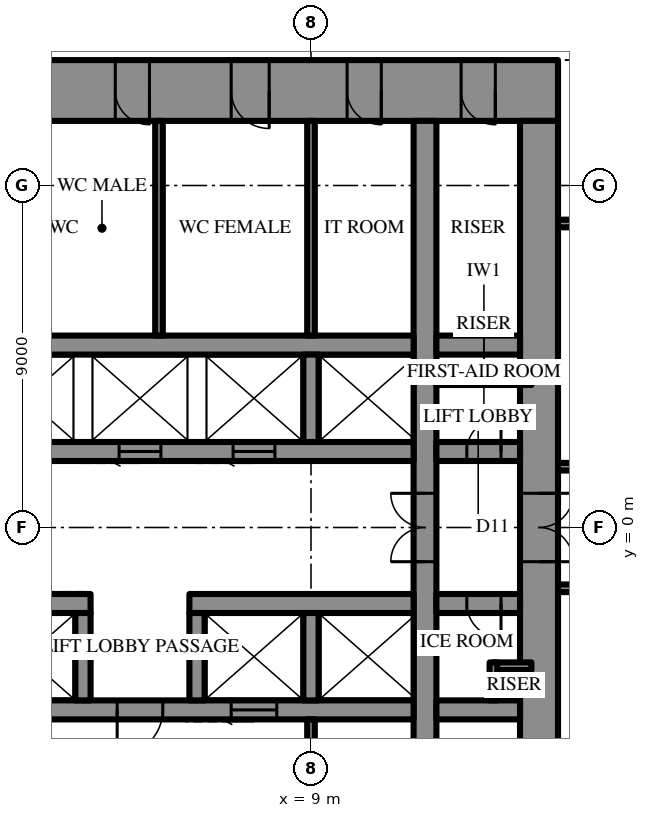
"""IFC4 building model, lengths in metres.
Left out: names, types, materials, properties, quantities, classifications, styles, units other than length and angle.
Written with IfcOpenShell. Run it as: python <this file> out.ifc"""

import sys

from ifc_helpers import new_model, si_unit, direction, frame, frame_2d, origin, place, context, subcontext, project, spatial, rectangle, extrude, element, fill, save


model = new_model("IFC4")
c1 = context("Model", 3, precision=1e-05, world=origin(), true_north=direction((0.0, 1.0)))
c2 = subcontext(c1, "Body", "Model", "MODEL_VIEW")
j1 = project(units=[si_unit("LENGTHUNIT", "METRE"), si_unit("PLANEANGLEUNIT", "RADIAN")], contexts=[c1])
p1 = place(None, origin())
s1 = spatial("IfcSite", under=j1, at=p1, CompositionType="ELEMENT")
p2 = place(p1, origin())
s2 = spatial("IfcBuilding", under=s1, at=p2, CompositionType="ELEMENT")
p3 = place(p2, frame((0.0, 0.0, 215.5)))
s3 = spatial("IfcBuildingStorey", under=s2, at=p3, CompositionType="ELEMENT", Elevation=215.5)
p4 = place(p3, frame((-15.5, 11.5, 0.0), z_axis=(0.0, 0.0, 1.0), x_axis=(1.0, 0.0, 0.0)))
e1 = element("IfcWall", 1, at=p4, inside=s3, PredefinedType="SHEAR", context=c2, shape_type="SweptSolid", body=[
    extrude(rectangle(XDim=31.0, YDim=1.6, at=frame_2d((15.5, 0.0))), origin(), (0.0, 0.0, 1.0), 4.2),
])
p5 = place(p4, frame((16.35, 0.0, 0.0)))
e2 = element("IfcOpeningElement", 2, at=p5, cuts=e1, PredefinedType="OPENING", context=c2, shape_type="SweptSolid", body=[
    extrude(rectangle(XDim=0.9, YDim=2.2, at=frame_2d((0.45, 1.1))), frame((0.0, 0.81, 0.0), z_axis=(0.0, -1.0, 0.0), x_axis=(1.0, 0.0, 0.0)), (0.0, 0.0, 1.0), 1.62),
])
p6 = place(p4, frame((19.35, 0.0, 0.0)))
e3 = element("IfcOpeningElement", 3, at=p6, cuts=e1, PredefinedType="OPENING", context=c2, shape_type="SweptSolid", body=[
    extrude(rectangle(XDim=0.9, YDim=2.2, at=frame_2d((0.45, 1.1))), frame((0.0, 0.81, 0.0), z_axis=(0.0, -1.0, 0.0), x_axis=(1.0, 0.0, 0.0)), (0.0, 0.0, 1.0), 1.62),
])
p7 = place(p4, frame((22.4, 0.0, 0.0)))
e4 = element("IfcOpeningElement", 4, at=p7, cuts=e1, PredefinedType="OPENING", context=c2, shape_type="SweptSolid", body=[
    extrude(rectangle(XDim=1.0, YDim=2.2, at=frame_2d((0.5, 1.1))), frame((0.0, 0.81, 0.0), z_axis=(0.0, -1.0, 0.0), x_axis=(1.0, 0.0, 0.0)), (0.0, 0.0, 1.0), 1.62),
])
p8 = place(p4, frame((1.65, 0.0, 0.0)))
e5 = element("IfcOpeningElement", 5, at=p8, cuts=e1, PredefinedType="OPENING", context=c2, shape_type="SweptSolid", body=[
    extrude(rectangle(XDim=0.9, YDim=2.2, at=frame_2d((0.45, 1.1))), frame((0.0, 0.81, 0.0), z_axis=(0.0, -1.0, 0.0), x_axis=(1.0, 0.0, 0.0)), (0.0, 0.0, 1.0), 1.62),
])
p9 = place(p4, frame((4.65, 0.0, 0.0)))
e6 = element("IfcOpeningElement", 6, at=p9, cuts=e1, PredefinedType="OPENING", context=c2, shape_type="SweptSolid", body=[
    extrude(rectangle(XDim=0.9, YDim=2.2, at=frame_2d((0.45, 1.1))), frame((0.0, 0.81, 0.0), z_axis=(0.0, -1.0, 0.0), x_axis=(1.0, 0.0, 0.0)), (0.0, 0.0, 1.0), 1.62),
])
p10 = place(p4, frame((25.45, 0.0, 0.0)))
e7 = element("IfcOpeningElement", 7, at=p10, cuts=e1, PredefinedType="OPENING", context=c2, shape_type="SweptSolid", body=[
    extrude(rectangle(XDim=0.9, YDim=2.2, at=frame_2d((0.45, 1.1))), frame((0.0, 0.81, 0.0), z_axis=(0.0, -1.0, 0.0), x_axis=(1.0, 0.0, 0.0)), (0.0, 0.0, 1.0), 1.62),
])
p11 = place(p4, frame((28.45, 0.0, 0.0)))
e8 = element("IfcOpeningElement", 8, at=p11, cuts=e1, PredefinedType="OPENING", context=c2, shape_type="SweptSolid", body=[
    extrude(rectangle(XDim=0.9, YDim=2.2, at=frame_2d((0.45, 1.1))), frame((0.0, 0.81, 0.0), z_axis=(0.0, -1.0, 0.0), x_axis=(1.0, 0.0, 0.0)), (0.0, 0.0, 1.0), 1.62),
])
p12 = place(p3, frame((15.0, -10.7, 0.0), z_axis=(0.0, 0.0, 1.0), x_axis=(0.0, 1.0, 0.0)))
e9 = element("IfcWall", 9, at=p12, inside=s3, PredefinedType="SHEAR", context=c2, shape_type="SweptSolid", body=[
    extrude(rectangle(XDim=21.4, YDim=1.0, at=frame_2d((10.7, 0.0))), origin(), (0.0, 0.0, 1.0), 4.2),
])
p13 = place(p12, frame((9.8, 0.0, 0.0)))
e10 = element("IfcOpeningElement", 10, at=p13, cuts=e9, PredefinedType="OPENING", context=c2, shape_type="SweptSolid", body=[
    extrude(rectangle(XDim=1.8, YDim=2.4, at=frame_2d((0.9, 1.2))), frame((0.0, 0.51, 0.0), z_axis=(0.0, -1.0, 0.0), x_axis=(1.0, 0.0, 0.0)), (0.0, 0.0, 1.0), 1.02),
])
p14 = place(p3, frame((12.0, -10.7, 0.0), z_axis=(0.0, 0.0, 1.0), x_axis=(0.0, 1.0, 0.0)))
e11 = element("IfcWall", 11, at=p14, inside=s3, PredefinedType="SHEAR", context=c2, shape_type="SweptSolid", body=[
    extrude(rectangle(XDim=21.4, YDim=0.6, at=frame_2d((10.7, 0.0))), origin(), (0.0, 0.0, 1.0), 4.2),
])
p15 = place(p14, frame((9.8, 0.0, 0.0)))
e12 = element("IfcOpeningElement", 12, at=p15, cuts=e11, PredefinedType="OPENING", context=c2, shape_type="SweptSolid", body=[
    extrude(rectangle(XDim=1.8, YDim=2.4, at=frame_2d((0.9, 1.2))), frame((0.0, 0.31, 0.0), z_axis=(0.0, -1.0, 0.0), x_axis=(1.0, 0.0, 0.0)), (0.0, 0.0, 1.0), 0.62),
])
p16 = place(p3, frame((-3.2, 2.0, 0.0), z_axis=(0.0, 0.0, 1.0), x_axis=(1.0, 0.0, 0.0)))
e13 = element("IfcWall", 13, at=p16, inside=s3, PredefinedType="SHEAR", context=c2, shape_type="SweptSolid", body=[
    extrude(rectangle(XDim=14.9, YDim=0.5, at=frame_2d((7.45, 0.0))), origin(), (0.0, 0.0, 1.0), 4.2),
])
p17 = place(p16, frame((1.15, 0.0, 0.0)))
e14 = element("IfcOpeningElement", 14, at=p17, cuts=e13, PredefinedType="OPENING", context=c2, shape_type="SweptSolid", body=[
    extrude(rectangle(XDim=1.1, YDim=2.2, at=frame_2d((0.55, 1.1))), frame((0.0, 0.26, 0.0), z_axis=(0.0, -1.0, 0.0), x_axis=(1.0, 0.0, 0.0)), (0.0, 0.0, 1.0), 0.52),
])
p18 = place(p16, frame((4.15, 0.0, 0.0)))
e15 = element("IfcOpeningElement", 15, at=p18, cuts=e13, PredefinedType="OPENING", context=c2, shape_type="SweptSolid", body=[
    extrude(rectangle(XDim=1.1, YDim=2.2, at=frame_2d((0.55, 1.1))), frame((0.0, 0.26, 0.0), z_axis=(0.0, -1.0, 0.0), x_axis=(1.0, 0.0, 0.0)), (0.0, 0.0, 1.0), 0.52),
])
p19 = place(p16, frame((7.15, 0.0, 0.0)))
e16 = element("IfcOpeningElement", 16, at=p19, cuts=e13, PredefinedType="OPENING", context=c2, shape_type="SweptSolid", body=[
    extrude(rectangle(XDim=1.1, YDim=2.2, at=frame_2d((0.55, 1.1))), frame((0.0, 0.26, 0.0), z_axis=(0.0, -1.0, 0.0), x_axis=(1.0, 0.0, 0.0)), (0.0, 0.0, 1.0), 0.52),
])
p20 = place(p16, frame((10.15, 0.0, 0.0)))
e17 = element("IfcOpeningElement", 17, at=p20, cuts=e13, PredefinedType="OPENING", context=c2, shape_type="SweptSolid", body=[
    extrude(rectangle(XDim=1.1, YDim=2.2, at=frame_2d((0.55, 1.1))), frame((0.0, 0.26, 0.0), z_axis=(0.0, -1.0, 0.0), x_axis=(1.0, 0.0, 0.0)), (0.0, 0.0, 1.0), 0.52),
])
p21 = place(p3, frame((12.3, 2.0, 0.0), z_axis=(0.0, 0.0, 1.0), x_axis=(1.0, 0.0, 0.0)))
e18 = element("IfcWall", 18, at=p21, inside=s3, PredefinedType="SHEAR", context=c2, shape_type="SweptSolid", body=[
    extrude(rectangle(XDim=2.2, YDim=0.5, at=frame_2d((1.1, 0.0))), origin(), (0.0, 0.0, 1.0), 4.2),
])
p22 = place(p21, frame((0.8, 0.0, 0.0)))
e19 = element("IfcOpeningElement", 19, at=p22, cuts=e18, PredefinedType="OPENING", context=c2, shape_type="SweptSolid", body=[
    extrude(rectangle(XDim=0.9, YDim=2.2, at=frame_2d((0.45, 1.1))), frame((0.0, 0.26, 0.0), z_axis=(0.0, -1.0, 0.0), x_axis=(1.0, 0.0, 0.0)), (0.0, 0.0, 1.0), 0.52),
])
p23 = place(p3, frame((-11.7, 4.8, 0.0), z_axis=(0.0, 0.0, 1.0), x_axis=(1.0, 0.0, 0.0)))
e20 = element("IfcWall", 20, at=p23, inside=s3, PredefinedType="SHEAR", context=c2, shape_type="SweptSolid", body=[
    extrude(rectangle(XDim=23.4, YDim=0.5, at=frame_2d((11.7, 0.0))), origin(), (0.0, 0.0, 1.0), 4.2),
])
p24 = place(p23, frame((6.6, 0.0, 0.0)))
e21 = element("IfcOpeningElement", 21, at=p24, cuts=e20, PredefinedType="OPENING", context=c2, shape_type="SweptSolid", body=[
    extrude(rectangle(XDim=1.2, YDim=2.2, at=frame_2d((0.6, 1.1))), frame((0.0, 0.26, 0.0), z_axis=(0.0, -1.0, 0.0), x_axis=(1.0, 0.0, 0.0)), (0.0, 0.0, 1.0), 0.52),
])
p25 = place(p23, frame((3.6, 0.0, 0.0)))
e22 = element("IfcOpeningElement", 22, at=p25, cuts=e20, PredefinedType="OPENING", context=c2, shape_type="SweptSolid", body=[
    extrude(rectangle(XDim=1.2, YDim=2.2, at=frame_2d((0.6, 1.1))), frame((0.0, 0.26, 0.0), z_axis=(0.0, -1.0, 0.0), x_axis=(1.0, 0.0, 0.0)), (0.0, 0.0, 1.0), 0.52),
])
p26 = place(p3, frame((12.3, 4.8, 0.0), z_axis=(0.0, 0.0, 1.0), x_axis=(1.0, 0.0, 0.0)))
e23 = element("IfcWall", 23, at=p26, inside=s3, PredefinedType="SHEAR", context=c2, shape_type="SweptSolid", body=[
    extrude(rectangle(XDim=2.2, YDim=0.5, at=frame_2d((1.1, 0.0))), origin(), (0.0, 0.0, 1.0), 4.2),
])
p27 = place(p3, frame((9.0, 2.25, 0.0), z_axis=(0.0, 0.0, 1.0), x_axis=(0.0, 1.0, 0.0)))
e24 = element("IfcWall", 24, at=p27, inside=s3, PredefinedType="SHEAR", context=c2, shape_type="SweptSolid", body=[
    extrude(rectangle(XDim=2.3, YDim=0.4, at=frame_2d((1.15, 0.0))), origin(), (0.0, 0.0, 1.0), 4.2),
])
p28 = place(p3, frame((14.5, -2.0, 0.0), z_axis=(0.0, 0.0, 1.0), x_axis=(-1.0, 0.0, 0.0)))
e25 = element("IfcWall", 25, at=p28, inside=s3, PredefinedType="SHEAR", context=c2, shape_type="SweptSolid", body=[
    extrude(rectangle(XDim=2.2, YDim=0.5, at=frame_2d((1.1, 0.0))), origin(), (0.0, 0.0, 1.0), 4.2),
])
p29 = place(p28, frame((0.5, 0.0, 0.0)))
e26 = element("IfcOpeningElement", 26, at=p29, cuts=e25, PredefinedType="OPENING", context=c2, shape_type="SweptSolid", body=[
    extrude(rectangle(XDim=0.9, YDim=2.2, at=frame_2d((0.45, 1.1))), frame((0.0, 0.26, 0.0), z_axis=(0.0, -1.0, 0.0), x_axis=(1.0, 0.0, 0.0)), (0.0, 0.0, 1.0), 0.52),
])
p30 = place(p3, frame((11.7, -2.0, 0.0), z_axis=(0.0, 0.0, 1.0), x_axis=(-1.0, 0.0, 0.0)))
e27 = element("IfcWall", 27, at=p30, inside=s3, PredefinedType="SHEAR", context=c2, shape_type="SweptSolid", body=[
    extrude(rectangle(XDim=5.9, YDim=0.5, at=frame_2d((2.95, 0.0))), origin(), (0.0, 0.0, 1.0), 4.2),
])
p31 = place(p3, frame((3.2, -2.0, 0.0), z_axis=(0.0, 0.0, 1.0), x_axis=(-1.0, 0.0, 0.0)))
e28 = element("IfcWall", 28, at=p31, inside=s3, PredefinedType="SHEAR", context=c2, shape_type="SweptSolid", body=[
    extrude(rectangle(XDim=14.9, YDim=0.5, at=frame_2d((7.45, 0.0))), origin(), (0.0, 0.0, 1.0), 4.2),
])
p32 = place(p31, frame((1.15, 0.0, 0.0)))
e29 = element("IfcOpeningElement", 29, at=p32, cuts=e28, PredefinedType="OPENING", context=c2, shape_type="SweptSolid", body=[
    extrude(rectangle(XDim=1.1, YDim=2.2, at=frame_2d((0.55, 1.1))), frame((0.0, 0.26, 0.0), z_axis=(0.0, -1.0, 0.0), x_axis=(1.0, 0.0, 0.0)), (0.0, 0.0, 1.0), 0.52),
])
p33 = place(p31, frame((4.15, 0.0, 0.0)))
e30 = element("IfcOpeningElement", 30, at=p33, cuts=e28, PredefinedType="OPENING", context=c2, shape_type="SweptSolid", body=[
    extrude(rectangle(XDim=1.1, YDim=2.2, at=frame_2d((0.55, 1.1))), frame((0.0, 0.26, 0.0), z_axis=(0.0, -1.0, 0.0), x_axis=(1.0, 0.0, 0.0)), (0.0, 0.0, 1.0), 0.52),
])
p34 = place(p31, frame((7.15, 0.0, 0.0)))
e31 = element("IfcOpeningElement", 31, at=p34, cuts=e28, PredefinedType="OPENING", context=c2, shape_type="SweptSolid", body=[
    extrude(rectangle(XDim=1.1, YDim=2.2, at=frame_2d((0.55, 1.1))), frame((0.0, 0.26, 0.0), z_axis=(0.0, -1.0, 0.0), x_axis=(1.0, 0.0, 0.0)), (0.0, 0.0, 1.0), 0.52),
])
p35 = place(p31, frame((10.15, 0.0, 0.0)))
e32 = element("IfcOpeningElement", 32, at=p35, cuts=e28, PredefinedType="OPENING", context=c2, shape_type="SweptSolid", body=[
    extrude(rectangle(XDim=1.1, YDim=2.2, at=frame_2d((0.55, 1.1))), frame((0.0, 0.26, 0.0), z_axis=(0.0, -1.0, 0.0), x_axis=(1.0, 0.0, 0.0)), (0.0, 0.0, 1.0), 0.52),
])
p36 = place(p3, frame((14.5, -4.8, 0.0), z_axis=(0.0, 0.0, 1.0), x_axis=(-1.0, 0.0, 0.0)))
e33 = element("IfcWall", 33, at=p36, inside=s3, PredefinedType="SHEAR", context=c2, shape_type="SweptSolid", body=[
    extrude(rectangle(XDim=2.2, YDim=0.5, at=frame_2d((1.1, 0.0))), origin(), (0.0, 0.0, 1.0), 4.2),
])
p37 = place(p3, frame((11.7, -4.8, 0.0), z_axis=(0.0, 0.0, 1.0), x_axis=(-1.0, 0.0, 0.0)))
e34 = element("IfcWall", 34, at=p37, inside=s3, PredefinedType="SHEAR", context=c2, shape_type="SweptSolid", body=[
    extrude(rectangle(XDim=23.4, YDim=0.5, at=frame_2d((11.7, 0.0))), origin(), (0.0, 0.0, 1.0), 4.2),
])
p38 = place(p37, frame((6.6, 0.0, 0.0)))
e35 = element("IfcOpeningElement", 35, at=p38, cuts=e34, PredefinedType="OPENING", context=c2, shape_type="SweptSolid", body=[
    extrude(rectangle(XDim=1.2, YDim=2.2, at=frame_2d((0.6, 1.1))), frame((0.0, 0.26, 0.0), z_axis=(0.0, -1.0, 0.0), x_axis=(1.0, 0.0, 0.0)), (0.0, 0.0, 1.0), 0.52),
])
p39 = place(p37, frame((3.6, 0.0, 0.0)))
e36 = element("IfcOpeningElement", 36, at=p39, cuts=e34, PredefinedType="OPENING", context=c2, shape_type="SweptSolid", body=[
    extrude(rectangle(XDim=1.2, YDim=2.2, at=frame_2d((0.6, 1.1))), frame((0.0, 0.26, 0.0), z_axis=(0.0, -1.0, 0.0), x_axis=(1.0, 0.0, 0.0)), (0.0, 0.0, 1.0), 0.52),
])
for number, where, z_axis, x_axis in (
    (37, (9.0, -2.25, 0.0), (0.0, 0.0, 1.0), (0.0, -1.0, 0.0)),
    (38, (6.0, -2.25, 0.0), (0.0, 0.0, 1.0), (0.0, -1.0, 0.0)),
    (39, (3.0, -2.25, 0.0), (0.0, 0.0, 1.0), (0.0, -1.0, 0.0)),
):
    element("IfcWall", number, at=place(p3, frame(where, z_axis=z_axis, x_axis=x_axis)), inside=s3, PredefinedType="SHEAR", context=c2, shape_type="SweptSolid", body=[
        extrude(rectangle(XDim=2.3, YDim=0.4, at=frame_2d((1.15, 0.0))), origin(), (0.0, 0.0, 1.0), 4.2),
    ])
for number, where, z_axis, x_axis in (
    (40, (9.0, 5.05, 0.0), (0.0, 0.0, 1.0), (0.0, 1.0, 0.0)),
    (41, (5.0, 5.05, 0.0), (0.0, 0.0, 1.0), (0.0, 1.0, 0.0)),
    (42, (9.0, -5.05, 0.0), (0.0, 0.0, 1.0), (0.0, -1.0, 0.0)),
):
    element("IfcWall", number, at=place(p3, frame(where, z_axis=z_axis, x_axis=x_axis)), inside=s3, PredefinedType="PARTITIONING", context=c2, shape_type="SweptSolid", body=[
        extrude(rectangle(XDim=5.65, YDim=0.2, at=frame_2d((2.825, 0.0))), origin(), (0.0, 0.0, 1.0), 4.0),
    ])
p40 = place(p3, frame((12.3, 3.85, 0.0), z_axis=(0.0, 0.0, 1.0), x_axis=(1.0, 0.0, 0.0)))
e43 = element("IfcWall", 43, at=p40, inside=s3, PredefinedType="PARTITIONING", context=c2, shape_type="SweptSolid", body=[
    extrude(rectangle(XDim=2.5, YDim=0.2, at=frame_2d((1.25, 0.0))), origin(), (0.0, 0.0, 1.0), 4.0),
])
for number, where, z_axis, x_axis in (
    (44, (14.8, -3.65, 0.0), (0.0, 0.0, 1.0), (-1.0, 0.0, 0.0)),
    (45, (13.8, -3.55, 0.0), (0.0, 0.0, 1.0), (0.0, -1.0, 0.0)),
):
    element("IfcWall", number, at=place(p3, frame(where, z_axis=z_axis, x_axis=x_axis)), inside=s3, PredefinedType="PARTITIONING", context=c2, shape_type="SweptSolid", body=[
        extrude(rectangle(XDim=1.0, YDim=0.2, at=frame_2d((0.5, 0.0))), origin(), (0.0, 0.0, 1.0), 4.0),
    ])
p41 = place(p3, frame((15.5, 1.6, 0.0), z_axis=(0.0, 0.0, 1.0), x_axis=(1.0, 0.0, 0.0)))
e46 = element("IfcWall", 46, at=p41, inside=s3, PredefinedType="PARTITIONING", context=c2, shape_type="SweptSolid", body=[
    extrude(rectangle(XDim=2.3, YDim=0.2, at=frame_2d((1.15, 0.0))), origin(), (0.0, 0.0, 1.0), 4.0),
])
p42 = place(p3, frame((15.5, -1.6, 0.0), z_axis=(0.0, 0.0, 1.0), x_axis=(1.0, 0.0, 0.0)))
e47 = element("IfcWall", 47, at=p42, inside=s3, PredefinedType="PARTITIONING", context=c2, shape_type="SweptSolid", body=[
    extrude(rectangle(XDim=9.7, YDim=0.2, at=frame_2d((4.85, 0.0))), origin(), (0.0, 0.0, 1.0), 4.0),
])
p43 = place(p42, frame((4.35, 0.0, 0.0)))
e48 = element("IfcOpeningElement", 48, at=p43, cuts=e47, PredefinedType="OPENING", context=c2, shape_type="SweptSolid", body=[
    extrude(rectangle(XDim=1.0, YDim=2.2, at=frame_2d((0.5, 1.1))), frame((0.0, 0.11, 0.0), z_axis=(0.0, -1.0, 0.0), x_axis=(1.0, 0.0, 0.0)), (0.0, 0.0, 1.0), 0.22),
])
p44 = place(p3, frame((15.5, 8.0, 0.0), z_axis=(0.0, 0.0, 1.0), x_axis=(1.0, 0.0, 0.0)))
e49 = element("IfcWall", 49, at=p44, inside=s3, PredefinedType="PARTITIONING", context=c2, shape_type="SweptSolid", body=[
    extrude(rectangle(XDim=13.113, YDim=0.2, at=frame_2d((6.557, 0.0))), origin(), (0.0, 0.0, 1.0), 4.0),
])
p45 = place(p44, frame((0.811, 0.0, 0.0)))
e50 = element("IfcOpeningElement", 50, at=p45, cuts=e49, PredefinedType="OPENING", context=c2, shape_type="SweptSolid", body=[
    extrude(rectangle(XDim=1.0, YDim=2.2, at=frame_2d((0.5, 1.1))), frame((0.0, 0.11, 0.0), z_axis=(0.0, -1.0, 0.0), x_axis=(1.0, 0.0, 0.0)), (0.0, 0.0, 1.0), 0.22),
])
p46 = place(p13, frame((1.8, 0.0, 0.0), z_axis=(0.0, 0.0, 1.0), x_axis=(-1.0, 0.0, 0.0)))
e51 = element("IfcDoor", 51, at=p46, inside=s3, OperationType="DOUBLE_DOOR_SINGLE_SWING", PredefinedType="DOOR", context=c2, shape_type="SweptSolid", body=[
    extrude(rectangle(XDim=1.8, YDim=2.4, at=frame_2d((0.9, 1.2))), frame((0.0, 0.025, 0.0), z_axis=(0.0, -1.0, 0.0), x_axis=(1.0, 0.0, 0.0)), (0.0, 0.0, 1.0), 0.05),
])
fill(e10, e51)
p47 = place(p6, frame((0.9, 0.0, 0.0), z_axis=(0.0, 0.0, 1.0), x_axis=(-1.0, 0.0, 0.0)))
e52 = element("IfcDoor", 52, at=p47, inside=s3, OperationType="SINGLE_SWING_RIGHT", PredefinedType="DOOR", context=c2, shape_type="SweptSolid", body=[
    extrude(rectangle(XDim=0.9, YDim=2.2, at=frame_2d((0.45, 1.1))), frame((0.0, 0.025, 0.0), z_axis=(0.0, -1.0, 0.0), x_axis=(1.0, 0.0, 0.0)), (0.0, 0.0, 1.0), 0.05),
])
fill(e3, e52)
p48 = place(p7, frame((1.0, 0.0, 0.0), z_axis=(0.0, 0.0, 1.0), x_axis=(-1.0, 0.0, 0.0)))
e53 = element("IfcDoor", 53, at=p48, inside=s3, OperationType="SINGLE_SWING_RIGHT", PredefinedType="DOOR", context=c2, shape_type="SweptSolid", body=[
    extrude(rectangle(XDim=1.0, YDim=2.2, at=frame_2d((0.5, 1.1))), frame((0.0, 0.025, 0.0), z_axis=(0.0, -1.0, 0.0), x_axis=(1.0, 0.0, 0.0)), (0.0, 0.0, 1.0), 0.05),
])
fill(e4, e53)
p49 = place(p10, frame((0.9, 0.0, 0.0), z_axis=(0.0, 0.0, 1.0), x_axis=(-1.0, 0.0, 0.0)))
e54 = element("IfcDoor", 54, at=p49, inside=s3, OperationType="SINGLE_SWING_RIGHT", PredefinedType="DOOR", context=c2, shape_type="SweptSolid", body=[
    extrude(rectangle(XDim=0.9, YDim=2.2, at=frame_2d((0.45, 1.1))), frame((0.0, 0.025, 0.0), z_axis=(0.0, -1.0, 0.0), x_axis=(1.0, 0.0, 0.0)), (0.0, 0.0, 1.0), 0.05),
])
fill(e7, e54)
p50 = place(p11, frame((0.9, 0.0, 0.0), z_axis=(0.0, 0.0, 1.0), x_axis=(-1.0, 0.0, 0.0)))
e55 = element("IfcDoor", 55, at=p50, inside=s3, OperationType="SINGLE_SWING_RIGHT", PredefinedType="DOOR", context=c2, shape_type="SweptSolid", body=[
    extrude(rectangle(XDim=0.9, YDim=2.2, at=frame_2d((0.45, 1.1))), frame((0.0, 0.025, 0.0), z_axis=(0.0, -1.0, 0.0), x_axis=(1.0, 0.0, 0.0)), (0.0, 0.0, 1.0), 0.05),
])
fill(e8, e55)
p51 = place(p38, origin())
e56 = element("IfcDoor", 56, at=p51, inside=s3, OperationType="SINGLE_SWING_LEFT", PredefinedType="DOOR", context=c2, shape_type="SweptSolid", body=[
    extrude(rectangle(XDim=1.2, YDim=2.2, at=frame_2d((0.6, 1.1))), frame((0.0, 0.025, 0.0), z_axis=(0.0, -1.0, 0.0), x_axis=(1.0, 0.0, 0.0)), (0.0, 0.0, 1.0), 0.05),
])
fill(e35, e56)
p52 = place(p22, origin())
e57 = element("IfcDoor", 57, at=p52, inside=s3, OperationType="SINGLE_SWING_LEFT", PredefinedType="DOOR", context=c2, shape_type="SweptSolid", body=[
    extrude(rectangle(XDim=0.9, YDim=2.2, at=frame_2d((0.45, 1.1))), frame((0.0, 0.025, 0.0), z_axis=(0.0, -1.0, 0.0), x_axis=(1.0, 0.0, 0.0)), (0.0, 0.0, 1.0), 0.05),
])
fill(e19, e57)
p53 = place(p29, origin())
e58 = element("IfcDoor", 58, at=p53, inside=s3, OperationType="SINGLE_SWING_RIGHT", PredefinedType="DOOR", context=c2, shape_type="SweptSolid", body=[
    extrude(rectangle(XDim=0.9, YDim=2.2, at=frame_2d((0.45, 1.1))), frame((0.0, 0.025, 0.0), z_axis=(0.0, -1.0, 0.0), x_axis=(1.0, 0.0, 0.0)), (0.0, 0.0, 1.0), 0.05),
])
fill(e26, e58)
p54 = place(p15, origin())
e59 = element("IfcDoor", 59, at=p54, inside=s3, OperationType="DOUBLE_DOOR_SINGLE_SWING", PredefinedType="DOOR", context=c2, shape_type="SweptSolid", body=[
    extrude(rectangle(XDim=1.8, YDim=2.4, at=frame_2d((0.9, 1.2))), frame((0.0, 0.025, 0.0), z_axis=(0.0, -1.0, 0.0), x_axis=(1.0, 0.0, 0.0)), (0.0, 0.0, 1.0), 0.05),
])
fill(e12, e59)
p55 = place(p19, frame((1.1, 0.0, 0.0), z_axis=(0.0, 0.0, 1.0), x_axis=(-1.0, 0.0, 0.0)))
e60 = element("IfcDoor", 60, at=p55, inside=s3, OperationType="SLIDING_TO_LEFT", PredefinedType="DOOR", context=c2, shape_type="SweptSolid", body=[
    extrude(rectangle(XDim=1.1, YDim=2.2, at=frame_2d((0.55, 1.1))), frame((0.0, 0.025, 0.0), z_axis=(0.0, -1.0, 0.0), x_axis=(1.0, 0.0, 0.0)), (0.0, 0.0, 1.0), 0.05),
])
fill(e16, e60)
p56 = place(p20, frame((1.1, 0.0, 0.0), z_axis=(0.0, 0.0, 1.0), x_axis=(-1.0, 0.0, 0.0)))
e61 = element("IfcDoor", 61, at=p56, inside=s3, OperationType="SLIDING_TO_LEFT", PredefinedType="DOOR", context=c2, shape_type="SweptSolid", body=[
    extrude(rectangle(XDim=1.1, YDim=2.2, at=frame_2d((0.55, 1.1))), frame((0.0, 0.025, 0.0), z_axis=(0.0, -1.0, 0.0), x_axis=(1.0, 0.0, 0.0)), (0.0, 0.0, 1.0), 0.05),
])
fill(e17, e61)
p57 = place(p39, origin())
e62 = element("IfcDoor", 62, at=p57, inside=s3, OperationType="SLIDING_TO_LEFT", PredefinedType="DOOR", context=c2, shape_type="SweptSolid", body=[
    extrude(rectangle(XDim=1.2, YDim=2.2, at=frame_2d((0.6, 1.1))), frame((0.0, 0.025, 0.0), z_axis=(0.0, -1.0, 0.0), x_axis=(1.0, 0.0, 0.0)), (0.0, 0.0, 1.0), 0.05),
])
fill(e36, e62)
save(model, sys.argv[1])
